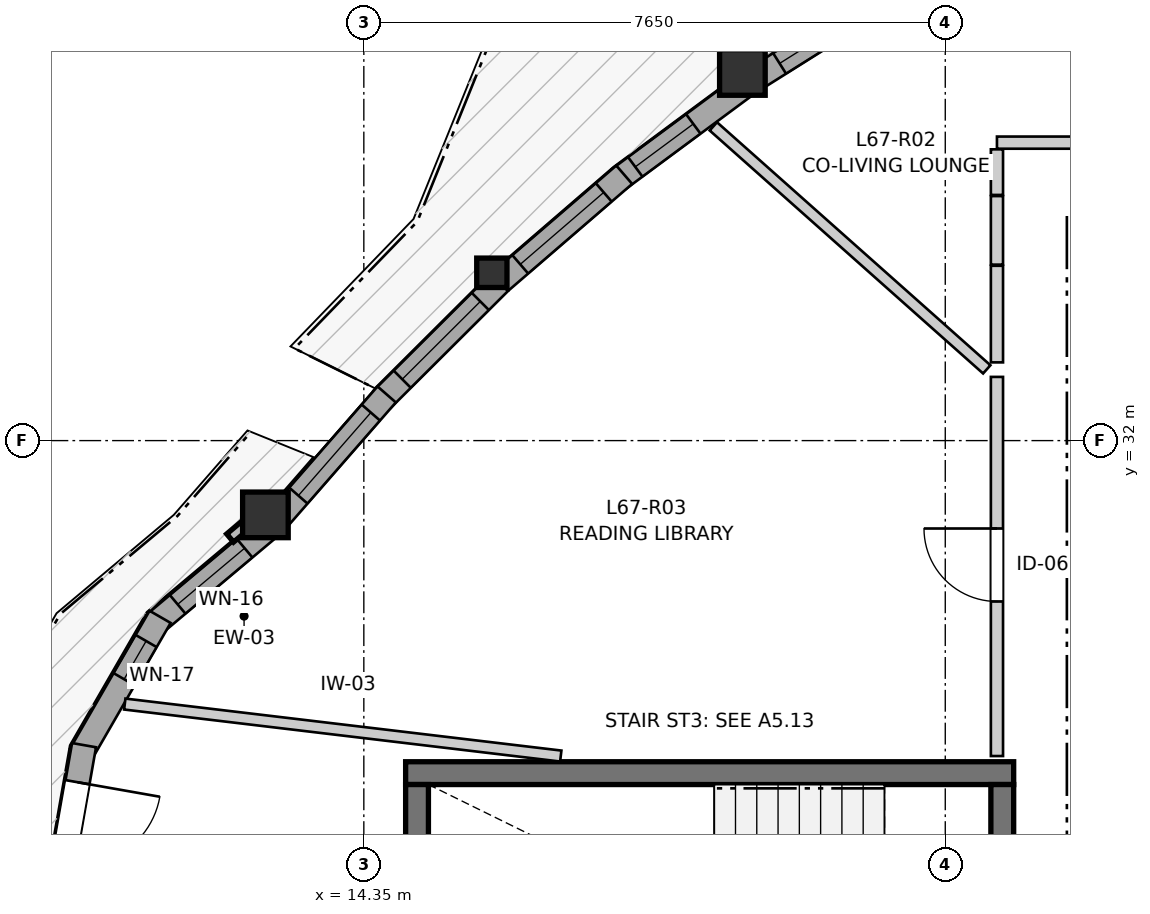
"""IFC4 building model, lengths in metres.
Left out: names, types, materials, properties, quantities, classifications, styles, units other than length and angle.
Written with IfcOpenShell. Run it as: python <this file> out.ifc"""

import sys

from ifc_helpers import new_model, si_unit, direction, frame, frame_2d, origin, origin_2d, place, context, subcontext, project, spatial, rectangle, i_section, extrude, source, transform, mapped, element, fill, save


model = new_model("IFC4")
c1 = context("Model", 3, precision=1e-05, world=origin(), true_north=direction((0.0, 1.0)))
c2 = subcontext(c1, "Body", "Model", "MODEL_VIEW")
j1 = project(units=[si_unit("LENGTHUNIT", "METRE"), si_unit("PLANEANGLEUNIT", "RADIAN")], contexts=[c1])
p1 = place(None, origin())
s1 = spatial("IfcSite", under=j1, at=p1, CompositionType="ELEMENT")
p2 = place(p1, origin())
s2 = spatial("IfcBuilding", under=s1, at=p2, CompositionType="ELEMENT")
p3 = place(p2, frame((0.0, 0.0, 224.4)))
s3 = spatial("IfcBuildingStorey", under=s2, at=p3, CompositionType="ELEMENT", Elevation=224.4)
p4 = place(p3, frame((22.9, 27.625, 0.0), z_axis=(0.0, 0.0, 1.0), x_axis=(-1.0, 0.0, 0.0)))
e1 = element("IfcWall", 1, at=p4, inside=s3, PredefinedType="SHEAR", context=c2, shape_type="SweptSolid", body=[
    extrude(rectangle(XDim=8.0, YDim=0.3, at=frame_2d((4.0, 0.0))), origin(), (0.0, 0.0, 1.0), 2.96),
])
p5 = place(p3, frame((15.05, 27.475, 0.0), z_axis=(0.0, 0.0, 1.0), x_axis=(0.0, -1.0, 0.0)))
e2 = element("IfcWall", 2, at=p5, inside=s3, PredefinedType="SHEAR", context=c2, shape_type="SweptSolid", body=[
    extrude(rectangle(XDim=2.95, YDim=0.3, at=frame_2d((1.475, 0.0))), origin(), (0.0, 0.0, 1.0), 2.96),
])
p6 = place(p3, frame((22.75, 24.525, 0.0), z_axis=(0.0, 0.0, 1.0), x_axis=(0.0, 1.0, 0.0)))
e3 = element("IfcWall", 3, at=p6, inside=s3, PredefinedType="SHEAR", context=c2, shape_type="SweptSolid", body=[
    extrude(rectangle(XDim=2.95, YDim=0.3, at=frame_2d((1.475, 0.0))), origin(), (0.0, 0.0, 1.0), 2.96),
])
p7 = place(p6, frame((0.985, 0.0, 0.0)))
e4 = element("IfcOpeningElement", 4, at=p7, cuts=e3, PredefinedType="OPENING", context=c2, shape_type="SweptSolid", body=[
    extrude(rectangle(XDim=0.98, YDim=2.15, at=frame_2d((0.49, 1.075))), frame((0.0, 0.16, 0.0), z_axis=(0.0, -1.0, 0.0), x_axis=(1.0, 0.0, 0.0)), (0.0, 0.0, 1.0), 0.32),
])
m1 = source(origin(), c2, "Body", "SweptSolid", [
    extrude(rectangle(XDim=0.6, YDim=0.6, at=origin_2d()), origin(), (0.0, 0.0, 1.0), 2.96),
])
for number, where, z_axis, x_axis in (
    (5, (13.055, 31.023, 0.0), (0.0, 0.0, 1.0), (1.0, 0.0, 0.0)),
    (6, (19.331, 36.843, 0.0), (0.0, 0.0, 1.0), (1.0, 0.0, 0.0)),
):
    element("IfcColumn", number, at=place(p3, frame(where, z_axis=z_axis, x_axis=x_axis)), inside=s3, PredefinedType="COLUMN", context=c2, shape_type="MappedRepresentation", body=[
        mapped(m1, transform((0.0, 0.0, 0.0), x_axis=(1.0, 0.0, 0.0), y_axis=(0.0, 1.0, 0.0), z_axis=(0.0, 0.0, 1.0), scale=1.0)),
    ])
m2 = source(origin(), c2, "Body", "SweptSolid", [
    extrude(i_section(OverallWidth=0.398, OverallDepth=0.387, WebThickness=0.019, FlangeThickness=0.03, FilletRadius=0.015, at=origin_2d()), origin(), (0.0, 0.0, 1.0), 2.96),
])
p8 = place(p3, frame((16.034, 34.208, 0.0), z_axis=(0.0, 0.0, 1.0), x_axis=(1.0, 0.0, 0.0)))
e7 = element("IfcColumn", 7, at=p8, inside=s3, PredefinedType="PILASTER", context=c2, shape_type="MappedRepresentation", body=[
    mapped(m2, transform((0.0, 0.0, 0.0), x_axis=(1.0, 0.0, 0.0), y_axis=(0.0, 1.0, 0.0), z_axis=(0.0, 0.0, 1.0), scale=1.0)),
])
p9 = place(p3, frame((13.089, 30.843, 0.0), z_axis=(0.0, 0.0, 1.0), x_axis=(-0.76606505432, -0.642763045414, 0.0)))
e8 = element("IfcWall", 8, at=p9, inside=s3, PredefinedType="SOLIDWALL", context=c2, shape_type="SweptSolid", body=[
    extrude(rectangle(XDim=1.962, YDim=0.32, at=frame_2d((0.981, 0.0))), origin(), (0.0, 0.0, 1.0), 2.58),
])
p10 = place(p9, frame((0.401, 0.0, 0.82)))
e9 = element("IfcOpeningElement", 9, at=p10, cuts=e8, PredefinedType="OPENING", context=c2, shape_type="SweptSolid", body=[
    extrude(rectangle(XDim=1.15, YDim=1.2, at=frame_2d((0.575, 0.6))), frame((0.0, 0.17, 0.0), z_axis=(0.0, -1.0, 0.0), x_axis=(1.0, 0.0, 0.0)), (0.0, 0.0, 1.0), 0.34),
])
p11 = place(p3, frame((11.669, 29.681, 0.0), z_axis=(0.0, 0.0, 1.0), x_axis=(-0.49990781971, -0.866078617559, 0.0)))
e10 = element("IfcWall", 10, at=p11, inside=s3, PredefinedType="SOLIDWALL", context=c2, shape_type="SweptSolid", body=[
    extrude(rectangle(XDim=2.09, YDim=0.32, at=frame_2d((1.045, 0.0))), origin(), (0.0, 0.0, 1.0), 2.58),
])
p12 = place(p11, frame((0.367, 0.0, 0.82)))
e11 = element("IfcOpeningElement", 11, at=p12, cuts=e10, PredefinedType="OPENING", context=c2, shape_type="SweptSolid", body=[
    extrude(rectangle(XDim=0.58, YDim=1.35, at=frame_2d((0.29, 0.675))), frame((0.0, 0.17, 0.0), z_axis=(0.0, -1.0, 0.0), x_axis=(1.0, 0.0, 0.0)), (0.0, 0.0, 1.0), 0.34),
])
p13 = place(p3, frame((10.669, 27.993, 0.0), z_axis=(0.0, 0.0, 1.0), x_axis=(-0.173672066494, -0.984803540469, 0.0)))
e12 = element("IfcWall", 12, at=p13, inside=s3, PredefinedType="SOLIDWALL", context=c2, shape_type="SweptSolid", body=[
    extrude(rectangle(XDim=2.09, YDim=0.32, at=frame_2d((1.045, 0.0))), origin(), (0.0, 0.0, 1.0), 2.58),
])
p14 = place(p13, frame((0.495, 0.0, 0.0)))
e13 = element("IfcOpeningElement", 13, at=p14, cuts=e12, PredefinedType="OPENING", context=c2, shape_type="SweptSolid", body=[
    extrude(rectangle(XDim=1.1, YDim=2.1, at=frame_2d((0.55, 1.05))), frame((0.0, 0.17, 0.0), z_axis=(0.0, -1.0, 0.0), x_axis=(1.0, 0.0, 0.0)), (0.0, 0.0, 1.0), 0.34),
])
p15 = place(p3, frame((21.215, 37.84, 0.0), z_axis=(0.0, 0.0, 1.0), x_axis=(-0.846356989859, -0.532616039672, 0.0)))
e14 = element("IfcWall", 14, at=p15, inside=s3, PredefinedType="SOLIDWALL", context=c2, shape_type="SweptSolid", body=[
    extrude(rectangle(XDim=2.036, YDim=0.32, at=frame_2d((1.018, 0.0))), origin(), (0.0, 0.0, 1.0), 2.58),
])
p16 = place(p15, frame((0.398, 0.0, 0.82)))
e15 = element("IfcOpeningElement", 15, at=p16, cuts=e14, PredefinedType="OPENING", context=c2, shape_type="SweptSolid", body=[
    extrude(rectangle(XDim=1.25, YDim=1.35, at=frame_2d((0.625, 0.675))), frame((0.0, 0.17, 0.0), z_axis=(0.0, -1.0, 0.0), x_axis=(1.0, 0.0, 0.0)), (0.0, 0.0, 1.0), 0.34),
])
p17 = place(p3, frame((19.354, 36.661, 0.0), z_axis=(0.0, 0.0, 1.0), x_axis=(-0.803846460046, -0.59483684206, 0.0)))
e16 = element("IfcWall", 16, at=p17, inside=s3, PredefinedType="SOLIDWALL", context=c2, shape_type="SweptSolid", body=[
    extrude(rectangle(XDim=2.048, YDim=0.32, at=frame_2d((1.024, 0.0))), origin(), (0.0, 0.0, 1.0), 2.58),
])
p18 = place(p17, frame((0.832, 0.0, 0.82)))
e17 = element("IfcOpeningElement", 17, at=p18, cuts=e16, PredefinedType="OPENING", context=c2, shape_type="SweptSolid", body=[
    extrude(rectangle(XDim=0.95, YDim=1.35, at=frame_2d((0.475, 0.675))), frame((0.0, 0.17, 0.0), z_axis=(0.0, -1.0, 0.0), x_axis=(1.0, 0.0, 0.0)), (0.0, 0.0, 1.0), 0.34),
])
p19 = place(p3, frame((17.776, 35.498, 0.0), z_axis=(0.0, 0.0, 1.0), x_axis=(-0.757443010922, -0.652901282894, 0.0)))
e18 = element("IfcWall", 18, at=p19, inside=s3, PredefinedType="SOLIDWALL", context=c2, shape_type="SweptSolid", body=[
    extrude(rectangle(XDim=2.142, YDim=0.32, at=frame_2d((1.071, 0.0))), origin(), (0.0, 0.0, 1.0), 2.58),
])
p20 = place(p19, frame((0.356, 0.0, 0.82)))
e19 = element("IfcOpeningElement", 19, at=p20, cuts=e18, PredefinedType="OPENING", context=c2, shape_type="SweptSolid", body=[
    extrude(rectangle(XDim=1.45, YDim=1.25, at=frame_2d((0.725, 0.625))), frame((0.0, 0.17, 0.0), z_axis=(0.0, -1.0, 0.0), x_axis=(1.0, 0.0, 0.0)), (0.0, 0.0, 1.0), 0.34),
])
p21 = place(p3, frame((16.133, 34.08, 0.0), z_axis=(0.0, 0.0, 1.0), x_axis=(-0.708395431826, -0.705815777784, 0.0)))
e20 = element("IfcWall", 20, at=p21, inside=s3, PredefinedType="SOLIDWALL", context=c2, shape_type="SweptSolid", body=[
    extrude(rectangle(XDim=2.177, YDim=0.32, at=frame_2d((1.088, 0.0))), origin(), (0.0, 0.0, 1.0), 2.58),
])
p22 = place(p21, frame((0.354, 0.0, 0.82)))
e21 = element("IfcOpeningElement", 21, at=p22, cuts=e20, PredefinedType="OPENING", context=c2, shape_type="SweptSolid", body=[
    extrude(rectangle(XDim=1.45, YDim=1.25, at=frame_2d((0.725, 0.625))), frame((0.0, 0.17, 0.0), z_axis=(0.0, -1.0, 0.0), x_axis=(1.0, 0.0, 0.0)), (0.0, 0.0, 1.0), 0.34),
])
p23 = place(p3, frame((14.65, 32.607, 0.0), z_axis=(0.0, 0.0, 1.0), x_axis=(-0.657629046069, -0.753341912923, 0.0)))
e22 = element("IfcWall", 22, at=p23, inside=s3, PredefinedType="SOLIDWALL", context=c2, shape_type="SweptSolid", body=[
    extrude(rectangle(XDim=2.153, YDim=0.32, at=frame_2d((1.076, 0.0))), origin(), (0.0, 0.0, 1.0), 2.58),
])
p24 = place(p23, frame((0.316, 0.0, 0.82)))
e23 = element("IfcOpeningElement", 23, at=p24, cuts=e22, PredefinedType="OPENING", context=c2, shape_type="SweptSolid", body=[
    extrude(rectangle(XDim=1.45, YDim=1.25, at=frame_2d((0.725, 0.625))), frame((0.0, 0.17, 0.0), z_axis=(0.0, -1.0, 0.0), x_axis=(1.0, 0.0, 0.0)), (0.0, 0.0, 1.0), 0.34),
])
p25 = place(p3, frame((22.68, 27.85, 0.0), z_axis=(0.0, 0.0, 1.0), x_axis=(0.0, 1.0, 0.0)))
e24 = element("IfcWall", 24, at=p25, inside=s3, PredefinedType="PARTITIONING", context=c2, shape_type="SweptSolid", body=[
    extrude(rectangle(XDim=4.988, YDim=0.16, at=frame_2d((2.494, 0.0))), origin(), (0.0, 0.0, 1.0), 2.96),
])
p26 = place(p25, frame((2.033, 0.0, 0.0)))
e25 = element("IfcOpeningElement", 25, at=p26, cuts=e24, PredefinedType="OPENING", context=c2, shape_type="SweptSolid", body=[
    extrude(rectangle(XDim=0.96, YDim=2.1, at=frame_2d((0.48, 1.05))), frame((0.0, 0.09, 0.0), z_axis=(0.0, -1.0, 0.0), x_axis=(1.0, 0.0, 0.0)), (0.0, 0.0, 1.0), 0.18),
])
p27 = place(p3, frame((11.205, 28.534, 0.0), z_axis=(0.0, 0.0, 1.0), x_axis=(0.9929685345, -0.118378585449, 0.0)))
e26 = element("IfcWall", 26, at=p27, inside=s3, PredefinedType="PARTITIONING", context=c2, shape_type="SweptSolid", body=[
    extrude(rectangle(XDim=5.777, YDim=0.145, at=frame_2d((2.888, 0.0))), origin(), (0.0, 0.0, 1.0), 2.96),
])
p28 = place(p3, frame((18.949, 36.134, 0.0), z_axis=(0.0, 0.0, 1.0), x_axis=(0.747482088067, -0.664281964243, 0.0)))
e27 = element("IfcWall", 27, at=p28, inside=s3, PredefinedType="PARTITIONING", context=c2, shape_type="SweptSolid", body=[
    extrude(rectangle(XDim=4.812, YDim=0.145, at=frame_2d((2.406, 0.0))), origin(), (0.0, 0.0, 1.0), 2.96),
])
p29 = place(p3, frame((22.68, 33.029, 0.0), z_axis=(0.0, 0.0, 1.0), x_axis=(0.0, 1.0, 0.0)))
e28 = element("IfcWall", 28, at=p29, inside=s3, PredefinedType="PARTITIONING", context=c2, shape_type="SweptSolid", body=[
    extrude(rectangle(XDim=1.271, YDim=0.16, at=frame_2d((0.635, 0.0))), origin(), (0.0, 0.0, 1.0), 2.628),
])
p30 = place(p3, frame((22.68, 35.92, 0.0), z_axis=(0.0, 0.0, 1.0), x_axis=(1.0, 0.0, 0.0)))
e29 = element("IfcWall", 29, at=p30, inside=s3, PredefinedType="PARTITIONING", context=c2, shape_type="SweptSolid", body=[
    extrude(rectangle(XDim=1.332, YDim=0.16, at=frame_2d((0.666, 0.0))), origin(), (0.0, 0.0, 1.0), 2.96),
])
p31 = place(p3, frame((22.68, 34.315, 0.0), z_axis=(0.0, 0.0, 1.0), x_axis=(0.0, 1.0, 0.0)))
e30 = element("IfcWall", 30, at=p31, inside=s3, PredefinedType="PARTITIONING", context=c2, shape_type="SweptSolid", body=[
    extrude(rectangle(XDim=0.902, YDim=0.16, at=frame_2d((0.451, 0.0))), origin(), (0.0, 0.0, 1.0), 2.96),
])
p32 = place(p3, frame((22.68, 35.232, 0.0), z_axis=(0.0, 0.0, 1.0), x_axis=(0.0, 1.0, 0.0)))
e31 = element("IfcWall", 31, at=p32, inside=s3, PredefinedType="PARTITIONING", context=c2, shape_type="SweptSolid", body=[
    extrude(rectangle(XDim=0.6, YDim=0.16, at=frame_2d((0.3, 0.0))), origin(), (0.0, 0.0, 1.0), 2.96),
])
m3 = source(origin(), c2, "Body", "SweptSolid", [
    extrude(rectangle(XDim=1.15, YDim=1.2, at=frame_2d((0.575, 0.6))), frame((0.0, 0.03, 0.0), z_axis=(0.0, -1.0, 0.0), x_axis=(1.0, 0.0, 0.0)), (0.0, 0.0, 1.0), 0.06),
])
p33 = place(p10, origin())
e32 = element("IfcWindow", 32, at=p33, inside=s3, PartitioningType="SINGLE_PANEL", PredefinedType="WINDOW", context=c2, shape_type="MappedRepresentation", body=[
    mapped(m3, transform((0.0, 0.0, 0.0), x_axis=(1.0, 0.0, 0.0), y_axis=(0.0, 1.0, 0.0), z_axis=(0.0, 0.0, 1.0), scale=1.0)),
])
fill(e9, e32)
m4 = source(origin(), c2, "Body", "SweptSolid", [
    extrude(rectangle(XDim=0.58, YDim=1.35, at=frame_2d((0.29, 0.675))), frame((0.0, 0.03, 0.0), z_axis=(0.0, -1.0, 0.0), x_axis=(1.0, 0.0, 0.0)), (0.0, 0.0, 1.0), 0.06),
])
p34 = place(p12, origin())
e33 = element("IfcWindow", 33, at=p34, inside=s3, PartitioningType="SINGLE_PANEL", PredefinedType="WINDOW", context=c2, shape_type="MappedRepresentation", body=[
    mapped(m4, transform((0.0, 0.0, 0.0), x_axis=(1.0, 0.0, 0.0), y_axis=(0.0, 1.0, 0.0), z_axis=(0.0, 0.0, 1.0), scale=1.0)),
])
fill(e11, e33)
m5 = source(origin(), c2, "Body", "SweptSolid", [
    extrude(rectangle(XDim=1.1, YDim=2.1, at=frame_2d((0.55, 1.05))), frame((0.0, 0.025, 0.0), z_axis=(0.0, -1.0, 0.0), x_axis=(1.0, 0.0, 0.0)), (0.0, 0.0, 1.0), 0.05),
])
p35 = place(p14, origin())
e34 = element("IfcDoor", 34, at=p35, inside=s3, OperationType="SINGLE_SWING_LEFT", PredefinedType="DOOR", context=c2, shape_type="MappedRepresentation", body=[
    mapped(m5, transform((0.0, 0.0, 0.0), x_axis=(1.0, 0.0, 0.0), y_axis=(0.0, 1.0, 0.0), z_axis=(0.0, 0.0, 1.0), scale=1.0)),
])
fill(e13, e34)
m6 = source(origin(), c2, "Body", "SweptSolid", [
    extrude(rectangle(XDim=1.25, YDim=1.35, at=frame_2d((0.625, 0.675))), frame((0.0, 0.03, 0.0), z_axis=(0.0, -1.0, 0.0), x_axis=(1.0, 0.0, 0.0)), (0.0, 0.0, 1.0), 0.06),
])
p36 = place(p16, origin())
e35 = element("IfcWindow", 35, at=p36, inside=s3, PartitioningType="SINGLE_PANEL", PredefinedType="WINDOW", context=c2, shape_type="MappedRepresentation", body=[
    mapped(m6, transform((0.0, 0.0, 0.0), x_axis=(1.0, 0.0, 0.0), y_axis=(0.0, 1.0, 0.0), z_axis=(0.0, 0.0, 1.0), scale=1.0)),
])
fill(e15, e35)
m7 = source(origin(), c2, "Body", "SweptSolid", [
    extrude(rectangle(XDim=0.95, YDim=1.35, at=frame_2d((0.475, 0.675))), frame((0.0, 0.03, 0.0), z_axis=(0.0, -1.0, 0.0), x_axis=(1.0, 0.0, 0.0)), (0.0, 0.0, 1.0), 0.06),
])
p37 = place(p18, origin())
e36 = element("IfcWindow", 36, at=p37, inside=s3, PartitioningType="SINGLE_PANEL", PredefinedType="WINDOW", context=c2, shape_type="MappedRepresentation", body=[
    mapped(m7, transform((0.0, 0.0, 0.0), x_axis=(1.0, 0.0, 0.0), y_axis=(0.0, 1.0, 0.0), z_axis=(0.0, 0.0, 1.0), scale=1.0)),
])
fill(e17, e36)
m8 = source(origin(), c2, "Body", "SweptSolid", [
    extrude(rectangle(XDim=1.45, YDim=1.25, at=frame_2d((0.725, 0.625))), frame((0.0, 0.03, 0.0), z_axis=(0.0, -1.0, 0.0), x_axis=(1.0, 0.0, 0.0)), (0.0, 0.0, 1.0), 0.06),
])
p38 = place(p20, origin())
e37 = element("IfcWindow", 37, at=p38, inside=s3, PartitioningType="SINGLE_PANEL", PredefinedType="WINDOW", context=c2, shape_type="MappedRepresentation", body=[
    mapped(m8, transform((0.0, 0.0, 0.0), x_axis=(1.0, 0.0, 0.0), y_axis=(0.0, 1.0, 0.0), z_axis=(0.0, 0.0, 1.0), scale=1.0)),
])
fill(e19, e37)
p39 = place(p22, origin())
e38 = element("IfcWindow", 38, at=p39, inside=s3, PartitioningType="SINGLE_PANEL", PredefinedType="WINDOW", context=c2, shape_type="MappedRepresentation", body=[
    mapped(m8, transform((0.0, 0.0, 0.0), x_axis=(1.0, 0.0, 0.0), y_axis=(0.0, 1.0, 0.0), z_axis=(0.0, 0.0, 1.0), scale=1.0)),
])
fill(e21, e38)
p40 = place(p24, origin())
e39 = element("IfcWindow", 39, at=p40, inside=s3, PartitioningType="SINGLE_PANEL", PredefinedType="WINDOW", context=c2, shape_type="MappedRepresentation", body=[
    mapped(m8, transform((0.0, 0.0, 0.0), x_axis=(1.0, 0.0, 0.0), y_axis=(0.0, 1.0, 0.0), z_axis=(0.0, 0.0, 1.0), scale=1.0)),
])
fill(e23, e39)
m9 = source(origin(), c2, "Body", "SweptSolid", [
    extrude(rectangle(XDim=0.96, YDim=2.1, at=frame_2d((0.48, 1.05))), frame((0.0, 0.025, 0.0), z_axis=(0.0, -1.0, 0.0), x_axis=(1.0, 0.0, 0.0)), (0.0, 0.0, 1.0), 0.05),
])
p41 = place(p26, origin())
e40 = element("IfcDoor", 40, at=p41, inside=s3, OperationType="SINGLE_SWING_RIGHT", PredefinedType="DOOR", context=c2, shape_type="MappedRepresentation", body=[
    mapped(m9, transform((0.0, 0.0, 0.0), x_axis=(1.0, 0.0, 0.0), y_axis=(0.0, 1.0, 0.0), z_axis=(0.0, 0.0, 1.0), scale=1.0)),
])
fill(e25, e40)
save(model, sys.argv[1])
